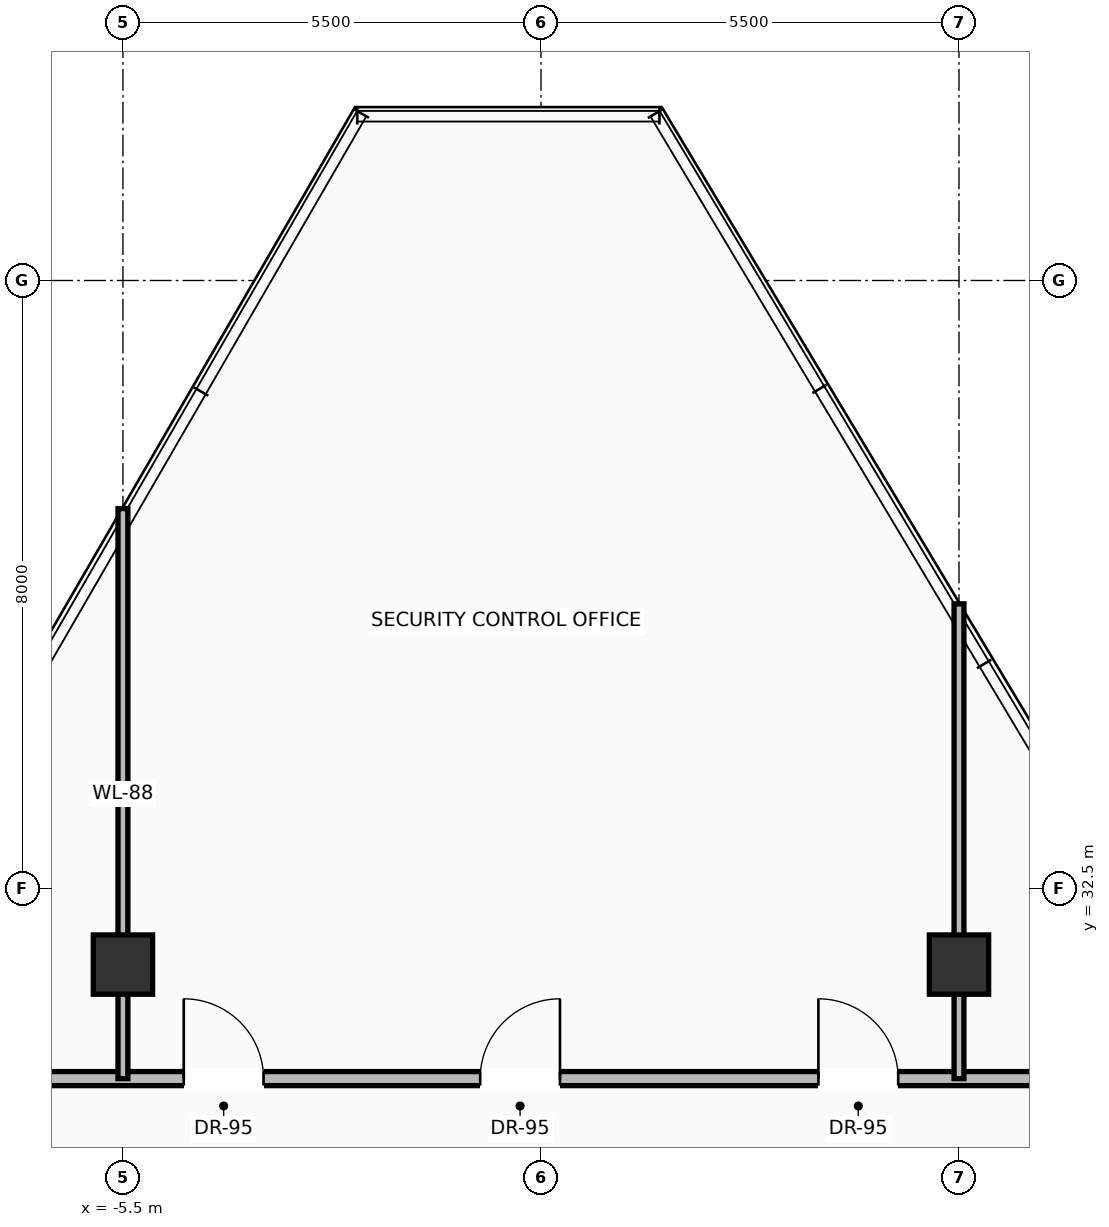
"""IFC4 building model, lengths in metres.
Left out: names, types, materials, properties, quantities, classifications, styles, units other than length and angle.
Written with IfcOpenShell. Run it as: python <this file> out.ifc"""

import sys

from ifc_helpers import new_model, si_unit, direction, frame, frame_2d, origin, origin_2d, place, context, subcontext, project, spatial, rectangle, extrude, source, transform, mapped, element, fill, save


model = new_model("IFC4")
c1 = context("Model", 3, precision=1e-05, world=origin(), true_north=direction((0.0, 1.0)))
c2 = subcontext(c1, "Body", "Model", "MODEL_VIEW")
j1 = project(units=[si_unit("LENGTHUNIT", "METRE"), si_unit("PLANEANGLEUNIT", "RADIAN")], contexts=[c1])
p1 = place(None, origin())
s1 = spatial("IfcSite", under=j1, at=p1, CompositionType="ELEMENT")
p2 = place(p1, origin())
s2 = spatial("IfcBuilding", under=s1, at=p2, CompositionType="ELEMENT")
p3 = place(p2, frame((0.0, 0.0, 266.1)))
s3 = spatial("IfcBuildingStorey", under=s2, at=p3, CompositionType="ELEMENT", Elevation=266.1)
m1 = source(origin(), c2, "Body", "SweptSolid", [
    extrude(rectangle(XDim=0.78, YDim=0.78, at=origin_2d()), origin(), (0.0, 0.0, 1.0), 3.45),
])
for number, where, z_axis, x_axis in (
    (1, (-5.5, 31.5, 0.0), (0.0, 0.0, 1.0), (1.0, 0.0, 0.0)),
    (2, (5.5, 31.5, 0.0), (0.0, 0.0, 1.0), (1.0, 0.0, 0.0)),
):
    element("IfcColumn", number, at=place(p3, frame(where, z_axis=z_axis, x_axis=x_axis)), inside=s3, PredefinedType="COLUMN", context=c2, shape_type="MappedRepresentation", body=[
        mapped(m1, transform((0.0, 0.0, 0.0), scale=1.0)),
    ])
p4 = place(p3, frame((-8.6, 30.0, 0.0), z_axis=(0.0, 0.0, 1.0), x_axis=(1.0, 0.0, 0.0)))
e3 = element("IfcWall", 3, at=p4, inside=s3, PredefinedType="PARTITIONING", context=c2, shape_type="SweptSolid", body=[
    extrude(rectangle(XDim=16.65, YDim=0.185, at=frame_2d((8.325, 0.0))), origin(), (0.0, 0.0, 1.0), 3.232),
])
p5 = place(p4, frame((3.9, 0.0, 0.0)))
e4 = element("IfcOpeningElement", 4, at=p5, cuts=e3, PredefinedType="OPENING", context=c2, shape_type="SweptSolid", body=[
    extrude(rectangle(XDim=1.05, YDim=2.25, at=frame_2d((0.525, 1.125))), frame((0.0, 0.103, 0.0), z_axis=(0.0, -1.0, 0.0), x_axis=(1.0, 0.0, 0.0)), (0.0, 0.0, 1.0), 0.205),
])
p6 = place(p4, frame((7.8, 0.0, 0.0)))
e5 = element("IfcOpeningElement", 5, at=p6, cuts=e3, PredefinedType="OPENING", context=c2, shape_type="SweptSolid", body=[
    extrude(rectangle(XDim=1.05, YDim=2.25, at=frame_2d((0.525, 1.125))), frame((0.0, 0.103, 0.0), z_axis=(0.0, -1.0, 0.0), x_axis=(1.0, 0.0, 0.0)), (0.0, 0.0, 1.0), 0.205),
])
p7 = place(p4, frame((12.25, 0.0, 0.0)))
e6 = element("IfcOpeningElement", 6, at=p7, cuts=e3, PredefinedType="OPENING", context=c2, shape_type="SweptSolid", body=[
    extrude(rectangle(XDim=1.05, YDim=2.25, at=frame_2d((0.525, 1.125))), frame((0.0, 0.103, 0.0), z_axis=(0.0, -1.0, 0.0), x_axis=(1.0, 0.0, 0.0)), (0.0, 0.0, 1.0), 0.205),
])
p8 = place(p3, frame((-5.5, 30.0, 0.0), z_axis=(0.0, 0.0, 1.0), x_axis=(0.0, 1.0, 0.0)))
e7 = element("IfcWall", 7, at=p8, inside=s3, PredefinedType="PARTITIONING", context=c2, shape_type="SweptSolid", body=[
    extrude(rectangle(XDim=7.499, YDim=0.13, at=frame_2d((3.75, 0.0))), origin(), (0.0, 0.0, 1.0), 2.683),
])
p9 = place(p3, frame((5.5, 30.0, 0.0), z_axis=(0.0, 0.0, 1.0), x_axis=(0.0, 1.0, 0.0)))
e8 = element("IfcWall", 8, at=p9, inside=s3, PredefinedType="PARTITIONING", context=c2, shape_type="SweptSolid", body=[
    extrude(rectangle(XDim=6.246, YDim=0.13, at=frame_2d((3.123, 0.0))), origin(), (0.0, 0.0, 1.0), 2.683),
])
m2 = source(origin(), c2, "Body", "SweptSolid", [
    extrude(rectangle(XDim=1.05, YDim=2.25, at=frame_2d((0.525, 1.125))), frame((0.0, 0.025, 0.0), z_axis=(0.0, -1.0, 0.0), x_axis=(1.0, 0.0, 0.0)), (0.0, 0.0, 1.0), 0.05),
])
p10 = place(p5, origin())
e9 = element("IfcDoor", 9, at=p10, inside=s3, OperationType="SINGLE_SWING_LEFT", PredefinedType="DOOR", context=c2, shape_type="MappedRepresentation", body=[
    mapped(m2, transform((0.0, 0.0, 0.0), scale=1.0)),
])
fill(e4, e9)
p11 = place(p6, origin())
e10 = element("IfcDoor", 10, at=p11, inside=s3, OperationType="SINGLE_SWING_RIGHT", PredefinedType="DOOR", context=c2, shape_type="MappedRepresentation", body=[
    mapped(m2, transform((0.0, 0.0, 0.0), scale=1.0)),
])
fill(e5, e10)
p12 = place(p7, origin())
e11 = element("IfcDoor", 11, at=p12, inside=s3, OperationType="SINGLE_SWING_LEFT", PredefinedType="DOOR", context=c2, shape_type="MappedRepresentation", body=[
    mapped(m2, transform((0.0, 0.0, 0.0), scale=1.0)),
])
fill(e6, e11)
save(model, sys.argv[1])
